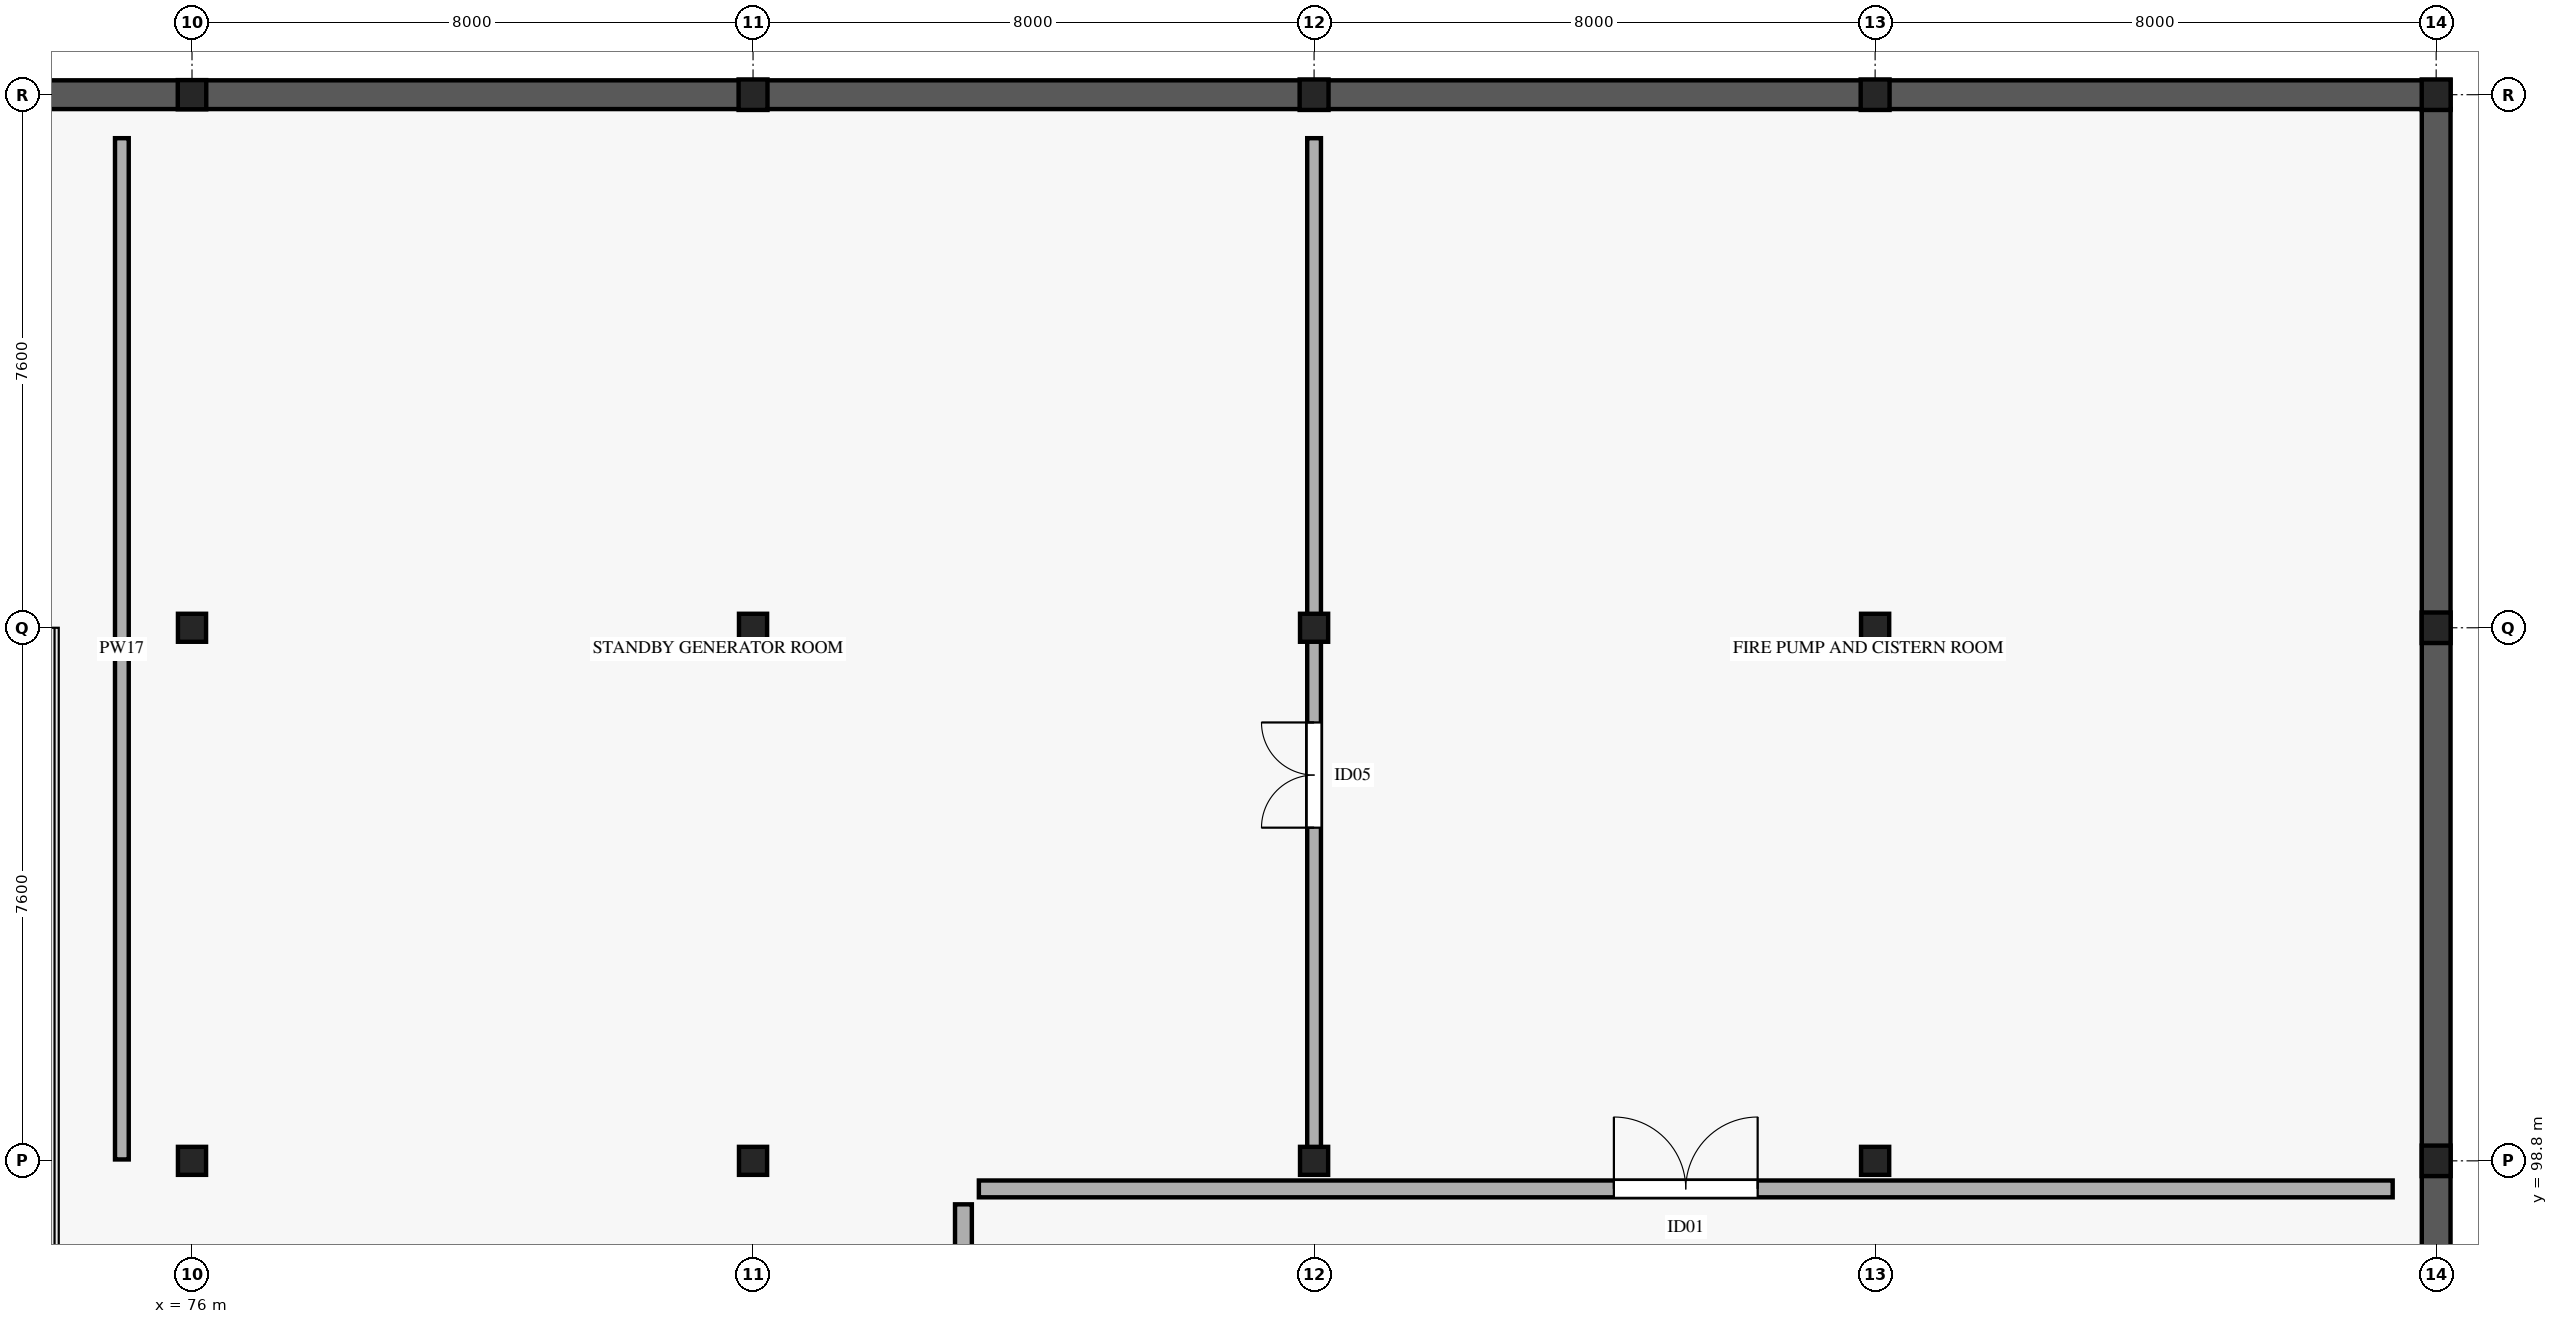
"""IFC4 building model, lengths in metres.
Left out: names, types, materials, properties, quantities, classifications, styles, units other than length and angle.
Written with IfcOpenShell. Run it as: python <this file> out.ifc"""

import sys

from ifc_helpers import new_model, si_unit, direction, frame, frame_2d, origin, origin_2d, place, context, subcontext, project, spatial, rectangle, i_section, extrude, element, fill, save


model = new_model("IFC4")
c1 = context("Model", 3, precision=1e-05, world=origin(), true_north=direction((0.0, 1.0)))
c2 = subcontext(c1, "Body", "Model", "MODEL_VIEW")
j1 = project(units=[si_unit("LENGTHUNIT", "METRE"), si_unit("PLANEANGLEUNIT", "RADIAN")], contexts=[c1])
p1 = place(None, origin())
s1 = spatial("IfcSite", under=j1, at=p1, CompositionType="ELEMENT")
p2 = place(p1, origin())
s2 = spatial("IfcBuilding", under=s1, at=p2, CompositionType="ELEMENT")
p3 = place(p2, frame((0.0, 0.0, -4.8)))
s3 = spatial("IfcBuildingStorey", under=s2, at=p3, CompositionType="ELEMENT", Elevation=-4.8)
for number, where, z_axis, x_axis in (
    (1, (76.0, 98.8, 0.0), (0.0, 0.0, 1.0), (1.0, 0.0, 0.0)),
    (2, (76.0, 106.4, 0.0), (0.0, 0.0, 1.0), (1.0, 0.0, 0.0)),
):
    element("IfcColumn", number, at=place(p3, frame(where, z_axis=z_axis, x_axis=x_axis)), inside=s3, PredefinedType="COLUMN", context=c2, shape_type="SweptSolid", body=[
        extrude(i_section(OverallWidth=0.401, OverallDepth=0.399, WebThickness=0.025, FlangeThickness=0.04, FilletRadius=0.015, at=origin_2d()), origin(), (0.0, 0.0, 1.0), 4.58),
    ])
p4 = place(p3, frame((76.0, 114.0, 0.0), z_axis=(0.0, 0.0, 1.0), x_axis=(1.0, 0.0, 0.0)))
e3 = element("IfcColumn", 3, at=p4, inside=s3, PredefinedType="COLUMN", context=c2, shape_type="SweptSolid", body=[
    extrude(i_section(OverallWidth=0.406, OverallDepth=0.416, WebThickness=0.03, FlangeThickness=0.048, FilletRadius=0.015, at=origin_2d()), origin(), (0.0, 0.0, 1.0), 4.58),
])
for number, where, z_axis, x_axis in (
    (4, (84.0, 98.8, 0.0), (0.0, 0.0, 1.0), (1.0, 0.0, 0.0)),
    (5, (84.0, 106.4, 0.0), (0.0, 0.0, 1.0), (1.0, 0.0, 0.0)),
):
    element("IfcColumn", number, at=place(p3, frame(where, z_axis=z_axis, x_axis=x_axis)), inside=s3, PredefinedType="COLUMN", context=c2, shape_type="SweptSolid", body=[
        extrude(i_section(OverallWidth=0.401, OverallDepth=0.399, WebThickness=0.025, FlangeThickness=0.04, FilletRadius=0.015, at=origin_2d()), origin(), (0.0, 0.0, 1.0), 4.58),
    ])
p5 = place(p3, frame((84.0, 114.0, 0.0), z_axis=(0.0, 0.0, 1.0), x_axis=(1.0, 0.0, 0.0)))
e6 = element("IfcColumn", 6, at=p5, inside=s3, PredefinedType="COLUMN", context=c2, shape_type="SweptSolid", body=[
    extrude(i_section(OverallWidth=0.412, OverallDepth=0.435, WebThickness=0.036, FlangeThickness=0.057, FilletRadius=0.015, at=origin_2d()), origin(), (0.0, 0.0, 1.0), 4.58),
])
for number, where, z_axis, x_axis in (
    (7, (92.0, 98.8, 0.0), (0.0, 0.0, 1.0), (1.0, 0.0, 0.0)),
    (8, (92.0, 106.4, 0.0), (0.0, 0.0, 1.0), (1.0, 0.0, 0.0)),
):
    element("IfcColumn", number, at=place(p3, frame(where, z_axis=z_axis, x_axis=x_axis)), inside=s3, PredefinedType="COLUMN", context=c2, shape_type="SweptSolid", body=[
        extrude(i_section(OverallWidth=0.401, OverallDepth=0.399, WebThickness=0.025, FlangeThickness=0.04, FilletRadius=0.015, at=origin_2d()), origin(), (0.0, 0.0, 1.0), 4.58),
    ])
p6 = place(p3, frame((92.0, 114.0, 0.0), z_axis=(0.0, 0.0, 1.0), x_axis=(1.0, 0.0, 0.0)))
e9 = element("IfcColumn", 9, at=p6, inside=s3, PredefinedType="COLUMN", context=c2, shape_type="SweptSolid", body=[
    extrude(i_section(OverallWidth=0.412, OverallDepth=0.435, WebThickness=0.036, FlangeThickness=0.057, FilletRadius=0.015, at=origin_2d()), origin(), (0.0, 0.0, 1.0), 4.58),
])
for number, where, z_axis, x_axis in (
    (10, (100.0, 98.8, 0.0), (0.0, 0.0, 1.0), (1.0, 0.0, 0.0)),
    (11, (100.0, 106.4, 0.0), (0.0, 0.0, 1.0), (1.0, 0.0, 0.0)),
):
    element("IfcColumn", number, at=place(p3, frame(where, z_axis=z_axis, x_axis=x_axis)), inside=s3, PredefinedType="COLUMN", context=c2, shape_type="SweptSolid", body=[
        extrude(i_section(OverallWidth=0.401, OverallDepth=0.399, WebThickness=0.025, FlangeThickness=0.04, FilletRadius=0.015, at=origin_2d()), origin(), (0.0, 0.0, 1.0), 4.58),
    ])
for number, where, z_axis, x_axis in (
    (12, (100.0, 114.0, 0.0), (0.0, 0.0, 1.0), (1.0, 0.0, 0.0)),
    (13, (108.0, 98.8, 0.0), (0.0, 0.0, 1.0), (1.0, 0.0, 0.0)),
    (14, (108.0, 106.4, 0.0), (0.0, 0.0, 1.0), (1.0, 0.0, 0.0)),
    (15, (108.0, 114.0, 0.0), (0.0, 0.0, 1.0), (1.0, 0.0, 0.0)),
):
    element("IfcColumn", number, at=place(p3, frame(where, z_axis=z_axis, x_axis=x_axis)), inside=s3, PredefinedType="COLUMN", context=c2, shape_type="SweptSolid", body=[
        extrude(i_section(OverallWidth=0.412, OverallDepth=0.435, WebThickness=0.036, FlangeThickness=0.057, FilletRadius=0.015, at=origin_2d()), origin(), (0.0, 0.0, 1.0), 4.58),
    ])
p7 = place(p3, frame((108.0, 46.205, 0.0), z_axis=(0.0, 0.0, 1.0), x_axis=(0.0, 1.0, 0.0)))
e16 = element("IfcWall", 16, at=p7, inside=s3, PredefinedType="USERDEFINED", context=c2, shape_type="SweptSolid", body=[
    extrude(rectangle(XDim=67.59, YDim=0.41, at=frame_2d((33.795, 0.0))), origin(), (0.0, 0.0, 1.0), 4.58),
])
p8 = place(p3, frame((108.205, 114.0, 0.0), z_axis=(0.0, 0.0, 1.0), x_axis=(-1.0, 0.0, 0.0)))
e17 = element("IfcWall", 17, at=p8, inside=s3, PredefinedType="USERDEFINED", context=c2, shape_type="SweptSolid", body=[
    extrude(rectangle(XDim=40.41, YDim=0.41, at=frame_2d((20.205, 0.0))), origin(), (0.0, 0.0, 1.0), 4.58),
])
p9 = place(p3, frame((87.22, 98.4, 0.0), z_axis=(0.0, 0.0, 1.0), x_axis=(1.0, 0.0, 0.0)))
e18 = element("IfcWall", 18, at=p9, inside=s3, PredefinedType="PARTITIONING", context=c2, shape_type="SweptSolid", body=[
    extrude(rectangle(XDim=20.16, YDim=0.24, at=frame_2d((10.08, 0.0))), origin(), (0.0, 0.0, 1.0), 3.45),
])
p10 = place(p9, frame((9.055, 0.0, 0.0)))
e19 = element("IfcOpeningElement", 19, at=p10, cuts=e18, PredefinedType="OPENING", context=c2, shape_type="SweptSolid", body=[
    extrude(rectangle(XDim=2.05, YDim=2.45, at=frame_2d((1.025, 1.225))), frame((0.0, 0.13, 0.0), z_axis=(0.0, -1.0, 0.0), x_axis=(1.0, 0.0, 0.0)), (0.0, 0.0, 1.0), 0.26),
])
p11 = place(p3, frame((87.0, 76.62, 0.0), z_axis=(0.0, 0.0, 1.0), x_axis=(0.0, 1.0, 0.0)))
e20 = element("IfcWall", 20, at=p11, inside=s3, PredefinedType="PARTITIONING", context=c2, shape_type="SweptSolid", body=[
    extrude(rectangle(XDim=21.56, YDim=0.24, at=frame_2d((10.78, 0.0))), origin(), (0.0, 0.0, 1.0), 3.45),
])
p12 = place(p3, frame((92.0, 98.82, 0.0), z_axis=(0.0, 0.0, 1.0), x_axis=(0.0, 1.0, 0.0)))
e21 = element("IfcWall", 21, at=p12, inside=s3, PredefinedType="PARTITIONING", context=c2, shape_type="SweptSolid", body=[
    extrude(rectangle(XDim=14.56, YDim=0.196, at=frame_2d((7.28, 0.0))), origin(), (0.0, 0.0, 1.0), 3.45),
])
p13 = place(p12, frame((4.73, 0.0, 0.0)))
e22 = element("IfcOpeningElement", 22, at=p13, cuts=e21, PredefinedType="OPENING", context=c2, shape_type="SweptSolid", body=[
    extrude(rectangle(XDim=1.5, YDim=2.2, at=frame_2d((0.75, 1.1))), frame((0.0, 0.108, 0.0), z_axis=(0.0, -1.0, 0.0), x_axis=(1.0, 0.0, 0.0)), (0.0, 0.0, 1.0), 0.216),
])
p14 = place(p3, frame((75.0, 98.82, 0.0), z_axis=(0.0, 0.0, 1.0), x_axis=(0.0, 1.0, 0.0)))
e23 = element("IfcWall", 23, at=p14, inside=s3, PredefinedType="PARTITIONING", context=c2, shape_type="SweptSolid", body=[
    extrude(rectangle(XDim=14.56, YDim=0.196, at=frame_2d((7.28, 0.0))), origin(), (0.0, 0.0, 1.0), 3.45),
])
p15 = place(p10, origin())
e24 = element("IfcDoor", 24, at=p15, inside=s3, OperationType="DOUBLE_DOOR_SINGLE_SWING", PredefinedType="DOOR", context=c2, shape_type="SweptSolid", body=[
    extrude(rectangle(XDim=2.05, YDim=2.45, at=frame_2d((1.025, 1.225))), frame((0.0, 0.025, 0.0), z_axis=(0.0, -1.0, 0.0), x_axis=(1.0, 0.0, 0.0)), (0.0, 0.0, 1.0), 0.05),
])
fill(e19, e24)
p16 = place(p13, origin())
e25 = element("IfcDoor", 25, at=p16, inside=s3, OperationType="DOUBLE_DOOR_SINGLE_SWING", PredefinedType="DOOR", context=c2, shape_type="SweptSolid", body=[
    extrude(rectangle(XDim=1.5, YDim=2.2, at=frame_2d((0.75, 1.1))), frame((0.0, 0.025, 0.0), z_axis=(0.0, -1.0, 0.0), x_axis=(1.0, 0.0, 0.0)), (0.0, 0.0, 1.0), 0.05),
])
fill(e22, e25)
save(model, sys.argv[1])
